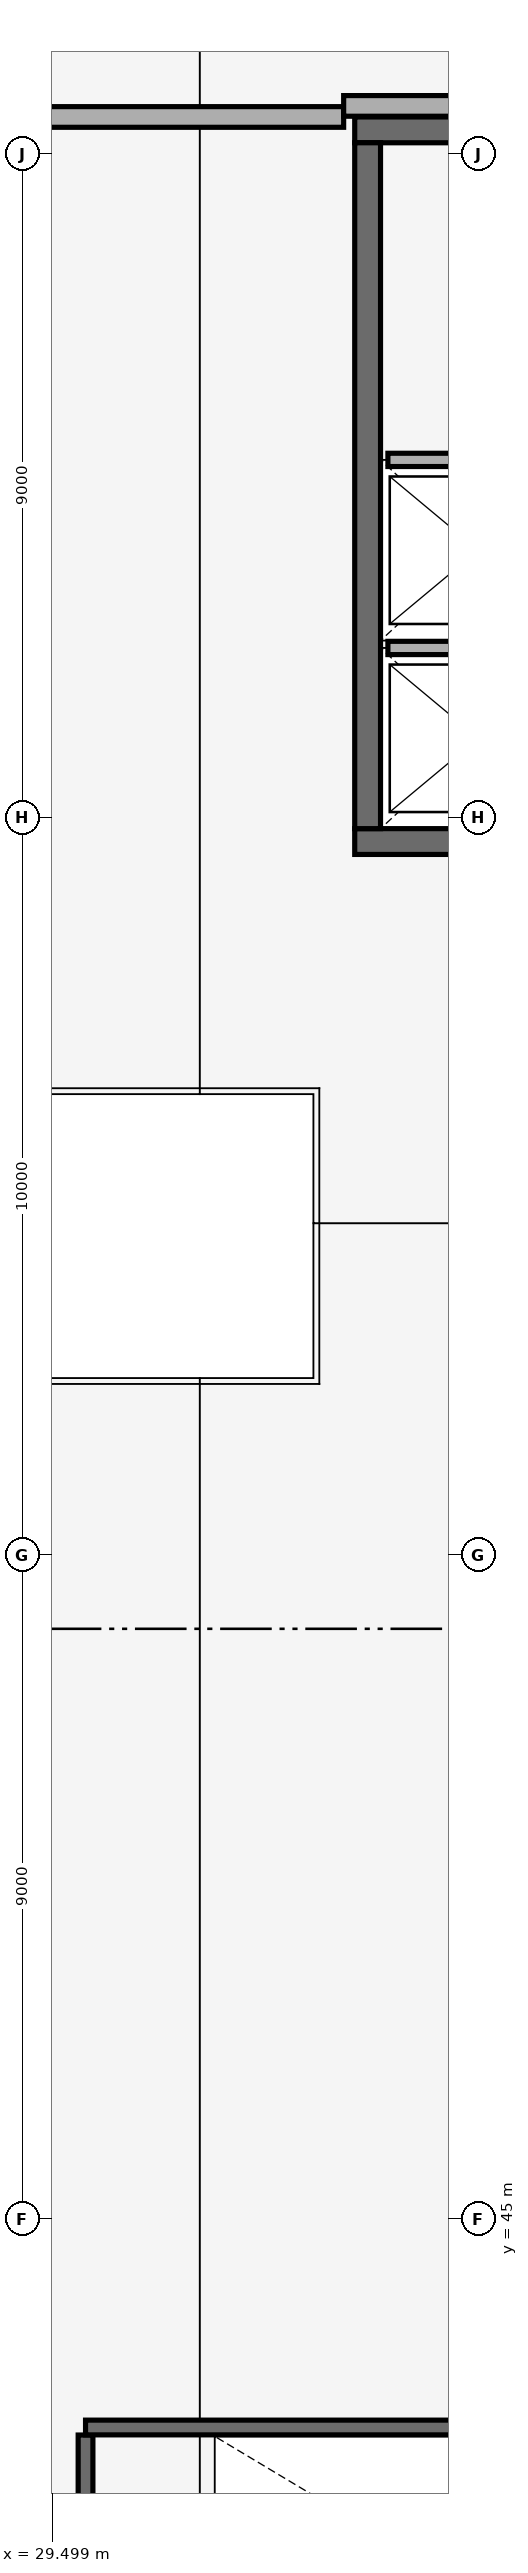
"""IFC4 building model, lengths in metres.
Left out: names, types, materials, properties, quantities, classifications, styles, units other than length and angle.
Written with IfcOpenShell. Run it as: python <this file> out.ifc"""

import sys

from ifc_helpers import new_model, si_unit, direction, frame, frame_2d, origin, place, context, subcontext, project, spatial, rectangle, extrude, element, save


model = new_model("IFC4")
c1 = context("Model", 3, precision=1e-05, world=origin(), true_north=direction((0.0, 1.0)))
c2 = subcontext(c1, "Body", "Model", "MODEL_VIEW")
j1 = project(units=[si_unit("LENGTHUNIT", "METRE"), si_unit("PLANEANGLEUNIT", "RADIAN")], contexts=[c1])
p1 = place(None, origin())
s1 = spatial("IfcSite", under=j1, at=p1, CompositionType="ELEMENT")
p2 = place(p1, origin())
s2 = spatial("IfcBuilding", under=s1, at=p2, CompositionType="ELEMENT")
p3 = place(p2, frame((0.0, 0.0, 15.0)))
s3 = spatial("IfcBuildingStorey", under=s2, at=p3, CompositionType="ELEMENT", Elevation=15.0)
for number, where, z_axis, x_axis in (
    (1, (33.6, 63.675, 0.0), (0.0, 0.0, 1.0), (1.0, 0.0, 0.0)),
    (2, (33.6, 73.325, 0.0), (0.0, 0.0, 1.0), (1.0, 0.0, 0.0)),
):
    element("IfcWall", number, at=place(p3, frame(where, z_axis=z_axis, x_axis=x_axis)), inside=s3, PredefinedType="SHEAR", context=c2, shape_type="SweptSolid", body=[
        extrude(rectangle(XDim=11.4, YDim=0.35, at=frame_2d((5.7, 0.0))), origin(), (0.0, 0.0, 1.0), 4.5),
    ])
p4 = place(p3, frame((33.775, 63.85, 0.0), z_axis=(0.0, 0.0, 1.0), x_axis=(0.0, 1.0, 0.0)))
e3 = element("IfcWall", 3, at=p4, inside=s3, PredefinedType="SHEAR", context=c2, shape_type="SweptSolid", body=[
    extrude(rectangle(XDim=9.3, YDim=0.35, at=frame_2d((4.65, 0.0))), origin(), (0.0, 0.0, 1.0), 4.5),
])
for number, where, z_axis, x_axis in (
    (4, (34.05, 66.3, 0.0), (0.0, 0.0, 1.0), (1.0, 0.0, 0.0)),
    (5, (34.05, 68.85, 0.0), (0.0, 0.0, 1.0), (1.0, 0.0, 0.0)),
):
    element("IfcWall", number, at=place(p3, frame(where, z_axis=z_axis, x_axis=x_axis)), inside=s3, PredefinedType="PARTITIONING", context=c2, shape_type="SweptSolid", body=[
        extrude(rectangle(XDim=2.45, YDim=0.18, at=frame_2d((1.225, 0.0))), origin(), (0.0, 0.0, 1.0), 4.5),
    ])
p5 = place(p3, frame((29.95, 38.382, 0.0), z_axis=(0.0, 0.0, 1.0), x_axis=(0.0, 1.0, 0.0)))
e6 = element("IfcWall", 6, at=p5, inside=s3, PredefinedType="SHEAR", context=c2, shape_type="SweptSolid", body=[
    extrude(rectangle(XDim=3.686, YDim=0.2, at=frame_2d((1.843, 0.0))), origin(), (0.0, 0.0, 1.0), 4.5),
])
p6 = place(p5, frame((1.293, 0.0, 0.0)))
e7 = element("IfcOpeningElement", 7, at=p6, cuts=e6, PredefinedType="OPENING", context=c2, shape_type="SweptSolid", body=[
    extrude(rectangle(XDim=1.1, YDim=2.15, at=frame_2d((0.55, 1.075))), frame((0.0, 0.11, 0.0), z_axis=(0.0, -1.0, 0.0), x_axis=(1.0, 0.0, 0.0)), (0.0, 0.0, 1.0), 0.22),
])
p7 = place(p3, frame((29.95, 42.17, 0.0), z_axis=(0.0, 0.0, 1.0), x_axis=(1.0, 0.0, 0.0)))
e8 = element("IfcWall", 8, at=p7, inside=s3, PredefinedType="SHEAR", context=c2, shape_type="SweptSolid", body=[
    extrude(rectangle(XDim=7.95, YDim=0.2, at=frame_2d((3.975, 0.0))), origin(), (0.0, 0.0, 1.0), 4.5),
])
p8 = place(p3, frame((33.45, 73.5, 0.0), z_axis=(0.0, 0.0, 1.0), x_axis=(-1.0, 0.0, 0.0)))
e9 = element("IfcWall", 9, at=p8, inside=s3, PredefinedType="PARTITIONING", context=c2, shape_type="SweptSolid", body=[
    extrude(rectangle(XDim=8.65, YDim=0.28, at=frame_2d((4.325, 0.0))), origin(), (0.0, 0.0, 1.0), 4.25),
])
p9 = place(p3, frame((42.0, 73.65, 0.0), z_axis=(0.0, 0.0, 1.0), x_axis=(-1.0, 0.0, 0.0)))
e10 = element("IfcWall", 10, at=p9, inside=s3, PredefinedType="PARTITIONING", context=c2, shape_type="SweptSolid", body=[
    extrude(rectangle(XDim=8.55, YDim=0.28, at=frame_2d((4.275, 0.0))), origin(), (0.0, 0.0, 1.0), 4.25),
])
save(model, sys.argv[1])
